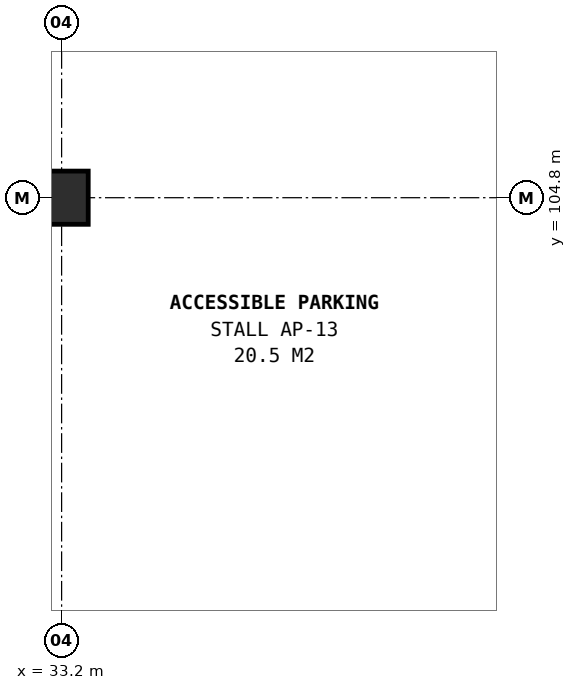
"""IFC4 building model, lengths in metres.
Left out: names, types, materials, properties, quantities, classifications, styles, units other than length and angle.
Written with IfcOpenShell. Run it as: python <this file> out.ifc"""

import sys

from ifc_helpers import new_model, si_unit, direction, frame, origin, origin_2d, place, context, subcontext, project, spatial, rectangle, extrude, element, save


model = new_model("IFC4")
c1 = context("Model", 3, precision=1e-05, world=origin(), true_north=direction((0.0, 1.0)))
c2 = subcontext(c1, "Body", "Model", "MODEL_VIEW")
j1 = project(units=[si_unit("LENGTHUNIT", "METRE"), si_unit("PLANEANGLEUNIT", "RADIAN")], contexts=[c1])
p1 = place(None, origin())
s1 = spatial("IfcSite", under=j1, at=p1, CompositionType="ELEMENT")
p2 = place(p1, origin())
s2 = spatial("IfcBuilding", under=s1, at=p2, CompositionType="ELEMENT")
p3 = place(p2, frame((0.0, 0.0, -4.5)))
s3 = spatial("IfcBuildingStorey", under=s2, at=p3, CompositionType="ELEMENT", Elevation=-4.5)
p4 = place(p3, frame((33.2, 104.8, 0.0), z_axis=(0.0, 0.0, 1.0), x_axis=(1.0, 0.0, 0.0)))
e1 = element("IfcColumn", 1, at=p4, inside=s3, PredefinedType="COLUMN", context=c2, shape_type="SweptSolid", body=[
    extrude(rectangle(XDim=0.7, YDim=0.7, at=origin_2d()), origin(), (0.0, 0.0, 1.0), 4.5),
])
save(model, sys.argv[1])
